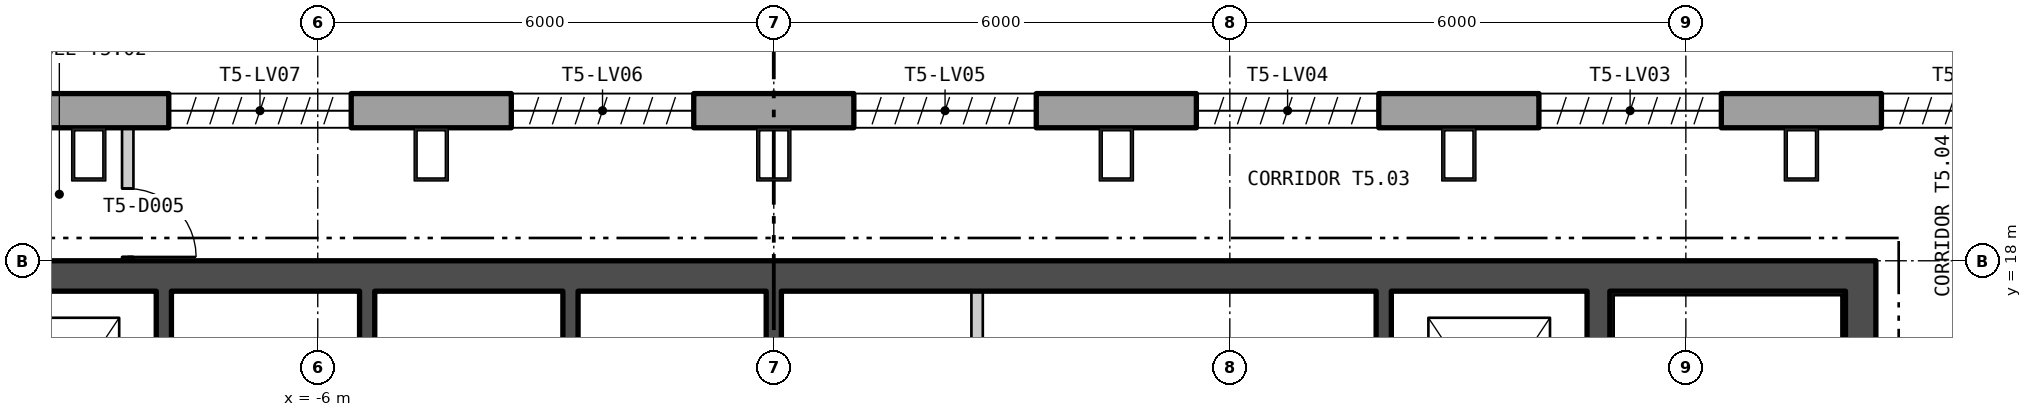
"""IFC4 building model, lengths in metres.
Left out: names, types, materials, properties, quantities, classifications, styles, units other than length and angle.
Written with IfcOpenShell. Run it as: python <this file> out.ifc"""

import sys

from ifc_helpers import new_model, si_unit, direction, frame, frame_2d, origin, origin_2d, place, context, subcontext, project, spatial, polyline, rectangle, hollow_rectangle, outline, extrude, element, fill, save


model = new_model("IFC4")
c1 = context("Model", 3, precision=1e-05, world=origin(), true_north=direction((0.0, 1.0)))
c2 = subcontext(c1, "Body", "Model", "MODEL_VIEW")
j1 = project(units=[si_unit("LENGTHUNIT", "METRE"), si_unit("PLANEANGLEUNIT", "RADIAN")], contexts=[c1])
p1 = place(None, origin())
s1 = spatial("IfcSite", under=j1, at=p1, CompositionType="ELEMENT")
p2 = place(p1, origin())
s2 = spatial("IfcBuilding", under=s1, at=p2, CompositionType="ELEMENT")
p3 = place(p2, frame((0.0, 0.0, 292.2)))
s3 = spatial("IfcBuildingStorey", under=s2, at=p3, CompositionType="ELEMENT", Elevation=292.2)
for number, where, z_axis, x_axis in (
    (1, (13.52, 19.4, 0.0), (0.0, 0.0, 1.0), (-1.0, 0.0, 0.0)),
    (2, (9.013, 19.4, 0.0), (0.0, 0.0, 1.0), (-1.0, 0.0, 0.0)),
    (3, (4.507, 19.4, 0.0), (0.0, 0.0, 1.0), (-1.0, 0.0, 0.0)),
    (4, (0.0, 19.4, 0.0), (0.0, 0.0, 1.0), (-1.0, 0.0, 0.0)),
    (5, (-4.507, 19.4, 0.0), (0.0, 0.0, 1.0), (-1.0, 0.0, 0.0)),
    (6, (-9.013, 19.4, 0.0), (0.0, 0.0, 1.0), (-1.0, 0.0, 0.0)),
):
    element("IfcColumn", number, at=place(p3, frame(where, z_axis=z_axis, x_axis=x_axis)), inside=s3, PredefinedType="COLUMN", context=c2, shape_type="SweptSolid", body=[
        extrude(hollow_rectangle(XDim=0.45, YDim=0.7, WallThickness=0.04, at=origin_2d()), origin(), (0.0, 0.0, 1.0), 6.0),
    ])
p4 = place(p3, frame((22.865, 19.975, -0.4), z_axis=(0.0, 0.0, 1.0), x_axis=(-1.0, 0.0, 0.0)))
e7 = element("IfcWall", 7, at=p4, inside=s3, PredefinedType="SOLIDWALL", context=c2, shape_type="SweptSolid", body=[
    extrude(outline(polyline([(-0.13, -0.225), (45.86, -0.225), (45.6, 0.225), (0.13, 0.225), (-0.13, -0.225)])), origin(), (0.0, 0.0, 1.0), 6.0),
])
p5 = place(p4, frame((1.424, 0.0, 1.6)))
e8 = element("IfcOpeningElement", 8, at=p5, cuts=e7, PredefinedType="OPENING", context=c2, shape_type="SweptSolid", body=[
    extrude(rectangle(XDim=2.4, YDim=3.6, at=frame_2d((1.2, 1.8))), frame((0.0, 0.235, 0.0), z_axis=(0.0, -1.0, 0.0), x_axis=(1.0, 0.0, 0.0)), (0.0, 0.0, 1.0), 0.47),
])
p6 = place(p4, frame((5.892, 0.0, 1.6)))
e9 = element("IfcOpeningElement", 9, at=p6, cuts=e7, PredefinedType="OPENING", context=c2, shape_type="SweptSolid", body=[
    extrude(rectangle(XDim=2.4, YDim=3.6, at=frame_2d((1.2, 1.8))), frame((0.0, 0.235, 0.0), z_axis=(0.0, -1.0, 0.0), x_axis=(1.0, 0.0, 0.0)), (0.0, 0.0, 1.0), 0.47),
])
p7 = place(p4, frame((10.399, 0.0, 1.6)))
e10 = element("IfcOpeningElement", 10, at=p7, cuts=e7, PredefinedType="OPENING", context=c2, shape_type="SweptSolid", body=[
    extrude(rectangle(XDim=2.4, YDim=3.6, at=frame_2d((1.2, 1.8))), frame((0.0, 0.235, 0.0), z_axis=(0.0, -1.0, 0.0), x_axis=(1.0, 0.0, 0.0)), (0.0, 0.0, 1.0), 0.47),
])
p8 = place(p4, frame((14.905, 0.0, 1.6)))
e11 = element("IfcOpeningElement", 11, at=p8, cuts=e7, PredefinedType="OPENING", context=c2, shape_type="SweptSolid", body=[
    extrude(rectangle(XDim=2.4, YDim=3.6, at=frame_2d((1.2, 1.8))), frame((0.0, 0.235, 0.0), z_axis=(0.0, -1.0, 0.0), x_axis=(1.0, 0.0, 0.0)), (0.0, 0.0, 1.0), 0.47),
])
p9 = place(p4, frame((19.412, 0.0, 1.6)))
e12 = element("IfcOpeningElement", 12, at=p9, cuts=e7, PredefinedType="OPENING", context=c2, shape_type="SweptSolid", body=[
    extrude(rectangle(XDim=2.4, YDim=3.6, at=frame_2d((1.2, 1.8))), frame((0.0, 0.235, 0.0), z_axis=(0.0, -1.0, 0.0), x_axis=(1.0, 0.0, 0.0)), (0.0, 0.0, 1.0), 0.47),
])
p10 = place(p4, frame((23.918, 0.0, 1.6)))
e13 = element("IfcOpeningElement", 13, at=p10, cuts=e7, PredefinedType="OPENING", context=c2, shape_type="SweptSolid", body=[
    extrude(rectangle(XDim=2.4, YDim=3.6, at=frame_2d((1.2, 1.8))), frame((0.0, 0.235, 0.0), z_axis=(0.0, -1.0, 0.0), x_axis=(1.0, 0.0, 0.0)), (0.0, 0.0, 1.0), 0.47),
])
p11 = place(p4, frame((28.425, 0.0, 1.6)))
e14 = element("IfcOpeningElement", 14, at=p11, cuts=e7, PredefinedType="OPENING", context=c2, shape_type="SweptSolid", body=[
    extrude(rectangle(XDim=2.4, YDim=3.6, at=frame_2d((1.2, 1.8))), frame((0.0, 0.235, 0.0), z_axis=(0.0, -1.0, 0.0), x_axis=(1.0, 0.0, 0.0)), (0.0, 0.0, 1.0), 0.47),
])
p12 = place(p4, frame((32.932, 0.0, 1.6)))
e15 = element("IfcOpeningElement", 15, at=p12, cuts=e7, PredefinedType="OPENING", context=c2, shape_type="SweptSolid", body=[
    extrude(rectangle(XDim=2.4, YDim=3.6, at=frame_2d((1.2, 1.8))), frame((0.0, 0.235, 0.0), z_axis=(0.0, -1.0, 0.0), x_axis=(1.0, 0.0, 0.0)), (0.0, 0.0, 1.0), 0.47),
])
p13 = place(p4, frame((37.438, 0.0, 1.6)))
e16 = element("IfcOpeningElement", 16, at=p13, cuts=e7, PredefinedType="OPENING", context=c2, shape_type="SweptSolid", body=[
    extrude(rectangle(XDim=2.4, YDim=3.6, at=frame_2d((1.2, 1.8))), frame((0.0, 0.235, 0.0), z_axis=(0.0, -1.0, 0.0), x_axis=(1.0, 0.0, 0.0)), (0.0, 0.0, 1.0), 0.47),
])
p14 = place(p4, frame((41.907, 0.0, 1.6)))
e17 = element("IfcOpeningElement", 17, at=p14, cuts=e7, PredefinedType="OPENING", context=c2, shape_type="SweptSolid", body=[
    extrude(rectangle(XDim=2.4, YDim=3.6, at=frame_2d((1.2, 1.8))), frame((0.0, 0.235, 0.0), z_axis=(0.0, -1.0, 0.0), x_axis=(1.0, 0.0, 0.0)), (0.0, 0.0, 1.0), 0.47),
])
p15 = place(p3, frame((-14.5, 17.8, 0.0), z_axis=(0.0, 0.0, 1.0), x_axis=(1.0, 0.0, 0.0)))
e18 = element("IfcWall", 18, at=p15, inside=s3, PredefinedType="SHEAR", context=c2, shape_type="SweptSolid", body=[
    extrude(rectangle(XDim=29.0, YDim=0.4, at=frame_2d((14.5, 0.0))), origin(), (0.0, 0.0, 1.0), 5.7),
])
p16 = place(p3, frame((14.3, 4.4, 0.0), z_axis=(0.0, 0.0, 1.0), x_axis=(0.0, 1.0, 0.0)))
e19 = element("IfcWall", 19, at=p16, inside=s3, PredefinedType="SHEAR", context=c2, shape_type="SweptSolid", body=[
    extrude(rectangle(XDim=13.2, YDim=0.4, at=frame_2d((6.6, 0.0))), origin(), (0.0, 0.0, 1.0), 5.7),
])
p17 = place(p16, frame((3.05, 0.0, 0.0)))
e20 = element("IfcOpeningElement", 20, at=p17, cuts=e19, PredefinedType="OPENING", context=c2, shape_type="SweptSolid", body=[
    extrude(rectangle(XDim=1.5, YDim=2.1, at=frame_2d((0.75, 1.05))), frame((0.0, 0.21, 0.0), z_axis=(0.0, -1.0, 0.0), x_axis=(1.0, 0.0, 0.0)), (0.0, 0.0, 1.0), 0.42),
])
p18 = place(p3, frame((10.85, 4.4, 0.0), z_axis=(0.0, 0.0, 1.0), x_axis=(0.0, 1.0, 0.0)))
e21 = element("IfcWall", 21, at=p18, inside=s3, PredefinedType="SHEAR", context=c2, shape_type="SweptSolid", body=[
    extrude(rectangle(XDim=13.2, YDim=0.3, at=frame_2d((6.6, 0.0))), origin(), (0.0, 0.0, 1.0), 5.7),
])
p19 = place(p18, frame((1.575, 0.0, 0.0)))
e22 = element("IfcOpeningElement", 22, at=p19, cuts=e21, PredefinedType="OPENING", context=c2, shape_type="SweptSolid", body=[
    extrude(rectangle(XDim=1.25, YDim=2.1, at=frame_2d((0.625, 1.05))), frame((0.0, 0.16, 0.0), z_axis=(0.0, -1.0, 0.0), x_axis=(1.0, 0.0, 0.0)), (0.0, 0.0, 1.0), 0.32),
])
p20 = place(p18, frame((0.4, 0.0, 0.0)))
e23 = element("IfcOpeningElement", 23, at=p20, cuts=e21, PredefinedType="OPENING", context=c2, shape_type="SweptSolid", body=[
    extrude(rectangle(XDim=0.9, YDim=2.1, at=frame_2d((0.45, 1.05))), frame((0.0, 0.16, 0.0), z_axis=(0.0, -1.0, 0.0), x_axis=(1.0, 0.0, 0.0)), (0.0, 0.0, 1.0), 0.32),
])
for number, where, z_axis, x_axis in (
    (24, (-8.025, 14.7, 0.0), (0.0, 0.0, 1.0), (0.0, 1.0, 0.0)),
    (25, (-5.35, 14.7, 0.0), (0.0, 0.0, 1.0), (0.0, 1.0, 0.0)),
    (26, (-2.675, 14.7, 0.0), (0.0, 0.0, 1.0), (0.0, 1.0, 0.0)),
    (27, (0.0, 14.7, 0.0), (0.0, 0.0, 1.0), (0.0, 1.0, 0.0)),
):
    element("IfcWall", number, at=place(p3, frame(where, z_axis=z_axis, x_axis=x_axis)), inside=s3, PredefinedType="SHEAR", context=c2, shape_type="SweptSolid", body=[
        extrude(rectangle(XDim=2.9, YDim=0.2, at=frame_2d((1.45, 0.0))), origin(), (0.0, 0.0, 1.0), 5.7),
    ])
p21 = place(p3, frame((2.675, 14.7, 0.0), z_axis=(0.0, 0.0, 1.0), x_axis=(0.0, 1.0, 0.0)))
e28 = element("IfcWall", 28, at=p21, inside=s3, PredefinedType="PARTITIONING", context=c2, shape_type="SweptSolid", body=[
    extrude(rectangle(XDim=2.9, YDim=0.15, at=frame_2d((1.45, 0.0))), origin(), (0.0, 0.0, 1.0), 5.7),
])
p22 = place(p3, frame((8.025, 14.7, 0.0), z_axis=(0.0, 0.0, 1.0), x_axis=(0.0, 1.0, 0.0)))
e29 = element("IfcWall", 29, at=p22, inside=s3, PredefinedType="SHEAR", context=c2, shape_type="SweptSolid", body=[
    extrude(rectangle(XDim=2.9, YDim=0.2, at=frame_2d((1.45, 0.0))), origin(), (0.0, 0.0, 1.0), 5.7),
])
p23 = place(p3, frame((-8.5, 18.0, 0.0), z_axis=(0.0, 0.0, 1.0), x_axis=(0.0, 1.0, 0.0)))
e30 = element("IfcWall", 30, at=p23, inside=s3, PredefinedType="PARTITIONING", context=c2, shape_type="SweptSolid", body=[
    extrude(rectangle(XDim=1.75, YDim=0.15, at=frame_2d((0.875, 0.0))), origin(), (0.0, 0.0, 1.0), 5.7),
])
p24 = place(p23, frame((0.05, 0.0, 0.0)))
e31 = element("IfcOpeningElement", 31, at=p24, cuts=e30, PredefinedType="OPENING", context=c2, shape_type="SweptSolid", body=[
    extrude(rectangle(XDim=0.9, YDim=2.1, at=frame_2d((0.45, 1.05))), frame((0.0, 0.085, 0.0), z_axis=(0.0, -1.0, 0.0), x_axis=(1.0, 0.0, 0.0)), (0.0, 0.0, 1.0), 0.17),
])
p25 = place(p24, origin())
e32 = element("IfcDoor", 32, at=p25, inside=s3, OperationType="SINGLE_SWING_LEFT", PredefinedType="DOOR", context=c2, shape_type="SweptSolid", body=[
    extrude(rectangle(XDim=0.9, YDim=2.1, at=frame_2d((0.45, 1.05))), frame((0.0, 0.025, 0.0), z_axis=(0.0, -1.0, 0.0), x_axis=(1.0, 0.0, 0.0)), (0.0, 0.0, 1.0), 0.05),
])
fill(e31, e32)
save(model, sys.argv[1])
